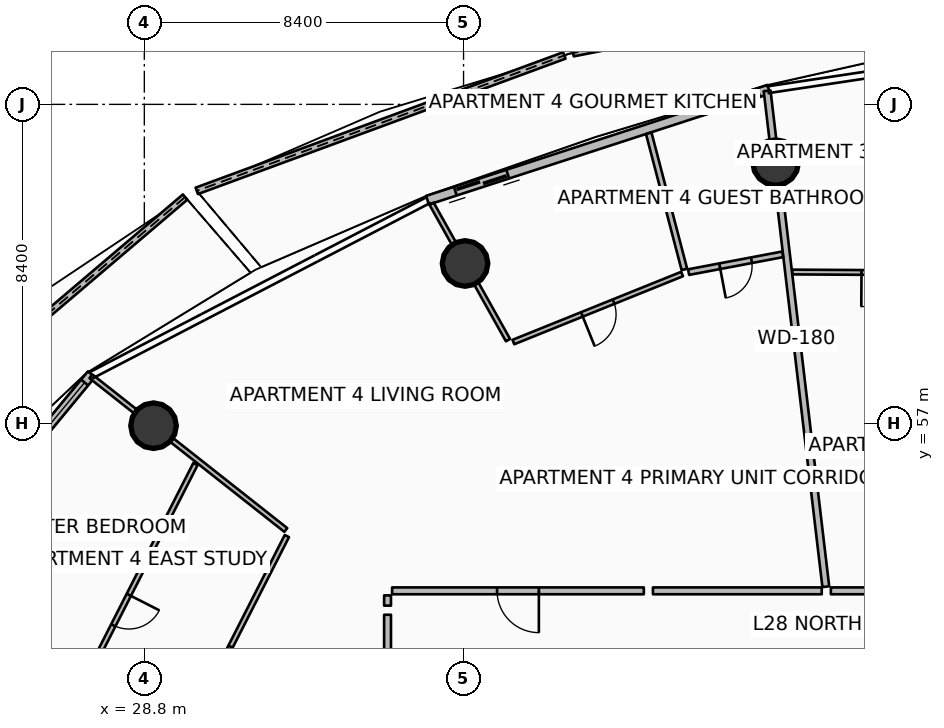
"""IFC4 building model, lengths in metres.
Left out: names, types, materials, properties, quantities, classifications, styles, units other than length and angle.
Written with IfcOpenShell. Run it as: python <this file> out.ifc"""

import sys

from ifc_helpers import new_model, si_unit, direction, frame, frame_2d, origin, origin_2d, place, context, subcontext, project, spatial, polyline, rectangle, circle, outline, extrude, element, fill, save


model = new_model("IFC4")
c1 = context("Model", 3, precision=1e-05, world=origin(), true_north=direction((0.0, 1.0)))
c2 = subcontext(c1, "Body", "Model", "MODEL_VIEW")
j1 = project(units=[si_unit("LENGTHUNIT", "METRE"), si_unit("PLANEANGLEUNIT", "RADIAN")], contexts=[c1])
p1 = place(None, origin())
s1 = spatial("IfcSite", under=j1, at=p1, CompositionType="ELEMENT")
p2 = place(p1, origin())
s2 = spatial("IfcBuilding", under=s1, at=p2, CompositionType="ELEMENT")
p3 = place(p2, frame((0.0, 0.0, 112.65)))
s3 = spatial("IfcBuildingStorey", under=s2, at=p3, CompositionType="ELEMENT", Elevation=112.65)
for number, where, z_axis, x_axis in (
    (1, (45.412, 63.869, 0.0), (0.032, -0.27, 0.962), (0.993, 0.118, 0.0)),
    (2, (37.24, 61.214, 0.0), (0.133, -0.237, 0.962), (0.872, 0.489, 0.0)),
):
    element("IfcColumn", number, at=place(p3, frame(where, z_axis=z_axis, x_axis=x_axis)), inside=s3, PredefinedType="COLUMN", context=c2, shape_type="SweptSolid", body=[
        extrude(circle(Radius=0.6, at=origin_2d()), origin(), (0.0, 0.0, 1.0), 3.606),
    ])
p4 = place(p3, frame((29.042, 56.945, 0.0), z_axis=(0.23244676176, -0.183255946608, 0.95518886142), x_axis=(0.619114149501, 0.785301005913, 0.0)))
e3 = element("IfcColumn", 3, at=p4, inside=s3, PredefinedType="COLUMN", context=c2, shape_type="SweptSolid", body=[
    extrude(circle(Radius=0.6, at=origin_2d()), origin(), (0.0, 0.0, 1.0), 3.633),
])
p5 = place(p3, frame((49.936, 68.686, 0.0), z_axis=(0.0, 0.0, 1.0), x_axis=(-0.98127943736, -0.192589370979, 0.0)))
e4 = element("IfcWall", 4, at=p5, inside=s3, PredefinedType="PARAPET", context=c2, shape_type="SweptSolid", body=[
    extrude(outline(polyline([(0.0, 0.0), (10.041, 0.0), (10.041, 1.632), (5.021, 1.418), (0.0, 1.233), (0.0, 0.0)])), frame((0.0, 0.09, 0.0), z_axis=(0.0, -1.0, 0.0), x_axis=(1.0, 0.0, 0.0)), (0.0, 0.0, 1.0), 0.18),
])
p6 = place(p3, frame((39.853, 66.687, 0.0), z_axis=(0.0, 0.0, 1.0), x_axis=(-0.938356460989, -0.345669136777, 0.0)))
e5 = element("IfcWall", 5, at=p6, inside=s3, PredefinedType="PARAPET", context=c2, shape_type="SweptSolid", body=[
    extrude(outline(polyline([(0.0, 0.0), (10.308, 0.0), (10.308, 1.86), (5.154, 1.798), (0.0, 1.632), (0.0, 0.0)])), frame((0.0, 0.09, 0.0), z_axis=(0.0, -1.0, 0.0), x_axis=(1.0, 0.0, 0.0)), (0.0, 0.0, 1.0), 0.18),
])
p7 = place(p3, frame((29.874, 62.962, 0.0), z_axis=(0.0, 0.0, 1.0), x_axis=(-0.761849488871, -0.647754086291, 0.0)))
e6 = element("IfcWall", 6, at=p7, inside=s3, PredefinedType="PARAPET", context=c2, shape_type="SweptSolid", body=[
    extrude(outline(polyline([(0.0, 0.0), (11.2, 0.0), (11.2, 1.632), (5.6, 1.798), (0.0, 1.86), (0.0, 0.0)])), frame((0.0, 0.09, 0.0), z_axis=(0.0, -1.0, 0.0), x_axis=(1.0, 0.0, 0.0)), (0.0, 0.0, 1.0), 0.18),
])
p8 = place(p3, frame((45.233, 65.797, 0.0), z_axis=(0.0, 0.0, 1.0), x_axis=(-0.951052494852, -0.30902937083, 0.0)))
e7 = element("IfcWall", 7, at=p8, inside=s3, PredefinedType="SOLIDWALL", context=c2, shape_type="SweptSolid", body=[
    extrude(rectangle(XDim=9.444, YDim=0.24, at=frame_2d((4.722, 0.0))), origin(), (0.0, 0.0, 1.0), 2.42),
])
p9 = place(p8, frame((7.224, 0.0, 0.0)))
e8 = element("IfcOpeningElement", 8, at=p9, cuts=e7, PredefinedType="OPENING", context=c2, shape_type="SweptSolid", body=[
    extrude(rectangle(XDim=1.45, YDim=2.15, at=frame_2d((0.725, 1.075))), frame((0.0, 0.13, 0.0), z_axis=(0.0, -1.0, 0.0), x_axis=(1.0, 0.0, 0.0)), (0.0, 0.0, 1.0), 0.26),
])
p10 = place(p8, frame((0.28, 0.0, 0.65)))
e9 = element("IfcOpeningElement", 9, at=p10, cuts=e7, PredefinedType="OPENING", context=c2, shape_type="SweptSolid", body=[
    extrude(rectangle(XDim=1.6, YDim=1.5, at=frame_2d((0.8, 0.75))), frame((0.0, 0.13, 0.0), z_axis=(0.0, -1.0, 0.0), x_axis=(1.0, 0.0, 0.0)), (0.0, 0.0, 1.0), 0.26),
])
p11 = place(p3, frame((27.407, 58.298, 0.0), z_axis=(0.0, 0.0, 1.0), x_axis=(-0.636704975, -0.771107498868, 0.0)))
e10 = element("IfcWall", 10, at=p11, inside=s3, PredefinedType="SOLIDWALL", context=c2, shape_type="SweptSolid", body=[
    extrude(rectangle(XDim=11.084, YDim=0.24, at=frame_2d((5.542, 0.0))), origin(), (0.0, 0.0, 1.0), 2.42),
])
p12 = place(p11, frame((8.864, 0.0, 0.0)))
e11 = element("IfcOpeningElement", 11, at=p12, cuts=e10, PredefinedType="OPENING", context=c2, shape_type="SweptSolid", body=[
    extrude(rectangle(XDim=1.45, YDim=2.15, at=frame_2d((0.725, 1.075))), frame((0.0, 0.13, 0.0), z_axis=(0.0, -1.0, 0.0), x_axis=(1.0, 0.0, 0.0)), (0.0, 0.0, 1.0), 0.26),
])
p13 = place(p11, frame((0.28, 0.0, 0.65)))
e12 = element("IfcOpeningElement", 12, at=p13, cuts=e10, PredefinedType="OPENING", context=c2, shape_type="SweptSolid", body=[
    extrude(rectangle(XDim=1.6, YDim=1.5, at=frame_2d((0.8, 0.75))), frame((0.0, 0.13, 0.0), z_axis=(0.0, -1.0, 0.0), x_axis=(1.0, 0.0, 0.0)), (0.0, 0.0, 1.0), 0.26),
])
p14 = place(p3, frame((46.732, 52.709, 0.0), z_axis=(0.0, 0.0, 1.0), x_axis=(-0.117532311618, 0.993069058891, 0.0)))
e13 = element("IfcWall", 13, at=p14, inside=s3, PredefinedType="PARTITIONING", context=c2, shape_type="SweptSolid", body=[
    extrude(rectangle(XDim=13.138, YDim=0.18, at=frame_2d((6.569, 0.0))), origin(), (0.0, 0.0, 1.0), 2.427),
])
p15 = place(p3, frame((50.869, 52.6, 0.0), z_axis=(0.0, 0.0, 1.0), x_axis=(-1.0, 0.0, 0.0)))
e14 = element("IfcWall", 14, at=p15, inside=s3, PredefinedType="PARTITIONING", context=c2, shape_type="SweptSolid", body=[
    extrude(rectangle(XDim=4.004, YDim=0.18, at=frame_2d((2.002, 0.0))), origin(), (0.0, 0.0, 1.0), 2.427),
])
p16 = place(p3, frame((50.391, 60.962, 0.0), z_axis=(0.0, 0.0, 1.0), x_axis=(-0.999982495953, 0.005916737914, 0.0)))
e15 = element("IfcWall", 15, at=p16, inside=s3, PredefinedType="PARTITIONING", context=c2, shape_type="SweptSolid", body=[
    extrude(rectangle(XDim=4.539, YDim=0.125, at=frame_2d((2.27, 0.0))), origin(), (0.0, 0.0, 1.0), 2.427),
])
p17 = place(p16, frame((1.819, 0.0, 0.0)))
e16 = element("IfcOpeningElement", 16, at=p17, cuts=e15, PredefinedType="OPENING", context=c2, shape_type="SweptSolid", body=[
    extrude(rectangle(XDim=0.9, YDim=2.08, at=frame_2d((0.45, 1.04))), frame((0.0, 0.073, 0.0), z_axis=(0.0, -1.0, 0.0), x_axis=(1.0, 0.0, 0.0)), (0.0, 0.0, 1.0), 0.145),
])
p18 = place(p3, frame((41.944, 52.6, 0.0), z_axis=(0.0, 0.0, 1.0), x_axis=(-1.0, 0.0, 0.0)))
e17 = element("IfcWall", 17, at=p18, inside=s3, PredefinedType="PARTITIONING", context=c2, shape_type="SweptSolid", body=[
    extrude(rectangle(XDim=6.624, YDim=0.18, at=frame_2d((3.312, 0.0))), origin(), (0.0, 0.0, 1.0), 2.427),
])
p19 = place(p18, frame((2.762, 0.0, 0.0)))
e18 = element("IfcOpeningElement", 18, at=p19, cuts=e17, PredefinedType="OPENING", context=c2, shape_type="SweptSolid", body=[
    extrude(rectangle(XDim=1.1, YDim=2.1, at=frame_2d((0.55, 1.05))), frame((0.0, 0.1, 0.0), z_axis=(0.0, -1.0, 0.0), x_axis=(1.0, 0.0, 0.0)), (0.0, 0.0, 1.0), 0.2),
])
p20 = place(p3, frame((35.2, 52.48, 0.0), z_axis=(0.0, 0.0, 1.0), x_axis=(0.0, -1.0, 0.0)))
e19 = element("IfcWall", 19, at=p20, inside=s3, PredefinedType="PARTITIONING", context=c2, shape_type="SweptSolid", body=[
    extrude(rectangle(XDim=0.269, YDim=0.18, at=frame_2d((0.135, 0.0))), origin(), (0.0, 0.0, 1.0), 2.427),
])
p21 = place(p3, frame((46.625, 52.6, 0.0), z_axis=(0.0, 0.0, 1.0), x_axis=(-1.0, 0.0, 0.0)))
e20 = element("IfcWall", 20, at=p21, inside=s3, PredefinedType="PARTITIONING", context=c2, shape_type="SweptSolid", body=[
    extrude(rectangle(XDim=4.442, YDim=0.18, at=frame_2d((2.221, 0.0))), origin(), (0.0, 0.0, 1.0), 2.427),
])
p22 = place(p3, frame((38.37, 59.196, 0.0), z_axis=(0.0, 0.0, 1.0), x_axis=(-0.488603368932, 0.87250601595, 0.0)))
e21 = element("IfcWall", 21, at=p22, inside=s3, PredefinedType="PARTITIONING", context=c2, shape_type="SweptSolid", body=[
    extrude(rectangle(XDim=4.113, YDim=0.125, at=frame_2d((2.057, 0.0))), origin(), (0.0, 0.0, 1.0), 2.427),
])
p23 = place(p3, frame((45.597, 61.455, 0.0), z_axis=(0.0, 0.0, 1.0), x_axis=(-0.982581250532, -0.18583349026, 0.0)))
e22 = element("IfcWall", 22, at=p23, inside=s3, PredefinedType="PARTITIONING", context=c2, shape_type="SweptSolid", body=[
    extrude(rectangle(XDim=2.519, YDim=0.15, at=frame_2d((1.259, 0.0))), origin(), (0.0, 0.0, 1.0), 2.427),
])
p24 = place(p23, frame((0.834, 0.0, 0.0)))
e23 = element("IfcOpeningElement", 23, at=p24, cuts=e22, PredefinedType="OPENING", context=c2, shape_type="SweptSolid", body=[
    extrude(rectangle(XDim=0.85, YDim=2.06, at=frame_2d((0.425, 1.03))), frame((0.0, 0.085, 0.0), z_axis=(0.0, -1.0, 0.0), x_axis=(1.0, 0.0, 0.0)), (0.0, 0.0, 1.0), 0.17),
])
p25 = place(p3, frame((43.011, 61.057, 0.0), z_axis=(0.0, 0.0, 1.0), x_axis=(-0.2532403996, 0.967403380194, 0.0)))
e24 = element("IfcWall", 24, at=p25, inside=s3, PredefinedType="PARTITIONING", context=c2, shape_type="SweptSolid", body=[
    extrude(rectangle(XDim=3.703, YDim=0.15, at=frame_2d((1.852, 0.0))), origin(), (0.0, 0.0, 1.0), 2.445),
])
p26 = place(p3, frame((42.95, 60.936, 0.0), z_axis=(0.0, 0.0, 1.0), x_axis=(-0.927456594122, -0.373930830529, 0.0)))
e25 = element("IfcWall", 25, at=p26, inside=s3, PredefinedType="PARTITIONING", context=c2, shape_type="SweptSolid", body=[
    extrude(rectangle(XDim=4.786, YDim=0.125, at=frame_2d((2.393, 0.0))), origin(), (0.0, 0.0, 1.0), 2.427),
])
p27 = place(p26, frame((1.943, 0.0, 0.0)))
e26 = element("IfcOpeningElement", 26, at=p27, cuts=e25, PredefinedType="OPENING", context=c2, shape_type="SweptSolid", body=[
    extrude(rectangle(XDim=0.9, YDim=2.08, at=frame_2d((0.45, 1.04))), frame((0.0, 0.073, 0.0), z_axis=(0.0, -1.0, 0.0), x_axis=(1.0, 0.0, 0.0)), (0.0, 0.0, 1.0), 0.145),
])
p28 = place(p3, frame((35.2, 51.971, 0.0), z_axis=(0.0, 0.0, 1.0), x_axis=(0.0, -1.0, 0.0)))
e27 = element("IfcWall", 27, at=p28, inside=s3, PredefinedType="PARTITIONING", context=c2, shape_type="SweptSolid", body=[
    extrude(rectangle(XDim=6.241, YDim=0.18, at=frame_2d((3.12, 0.0))), origin(), (0.0, 0.0, 1.0), 2.427),
])
p29 = place(p3, frame((32.522, 54.202, 0.0), z_axis=(0.0, 0.0, 1.0), x_axis=(-0.785296086335, 0.619120389574, 0.0)))
e28 = element("IfcWall", 28, at=p29, inside=s3, PredefinedType="PARTITIONING", context=c2, shape_type="SweptSolid", body=[
    extrude(rectangle(XDim=6.529, YDim=0.125, at=frame_2d((3.265, 0.0))), origin(), (0.0, 0.0, 1.0), 2.427),
])
p30 = place(p3, frame((32.551, 54.042, 0.0), z_axis=(0.0, 0.0, 1.0), x_axis=(-0.45400796994, -0.890997622461, 0.0)))
e29 = element("IfcWall", 29, at=p30, inside=s3, PredefinedType="PARTITIONING", context=c2, shape_type="SweptSolid", body=[
    extrude(rectangle(XDim=7.431, YDim=0.125, at=frame_2d((3.716, 0.0))), origin(), (0.0, 0.0, 1.0), 2.427),
])
p31 = place(p30, frame((3.265, 0.0, 0.0)))
e30 = element("IfcOpeningElement", 30, at=p31, cuts=e29, PredefinedType="OPENING", context=c2, shape_type="SweptSolid", body=[
    extrude(rectangle(XDim=0.9, YDim=2.08, at=frame_2d((0.45, 1.04))), frame((0.0, 0.073, 0.0), z_axis=(0.0, -1.0, 0.0), x_axis=(1.0, 0.0, 0.0)), (0.0, 0.0, 1.0), 0.145),
])
p32 = place(p3, frame((30.146, 55.938, 0.0), z_axis=(0.0, 0.0, 1.0), x_axis=(-0.454004640198, -0.890999319124, 0.0)))
e31 = element("IfcWall", 31, at=p32, inside=s3, PredefinedType="PARTITIONING", context=c2, shape_type="SweptSolid", body=[
    extrude(rectangle(XDim=8.626, YDim=0.125, at=frame_2d((4.313, 0.0))), origin(), (0.0, 0.0, 1.0), 2.427),
])
p33 = place(p32, frame((3.863, 0.0, 0.0)))
e32 = element("IfcOpeningElement", 32, at=p33, cuts=e31, PredefinedType="OPENING", context=c2, shape_type="SweptSolid", body=[
    extrude(rectangle(XDim=0.9, YDim=2.08, at=frame_2d((0.45, 1.04))), frame((0.0, 0.073, 0.0), z_axis=(0.0, -1.0, 0.0), x_axis=(1.0, 0.0, 0.0)), (0.0, 0.0, 1.0), 0.145),
])
p34 = place(p9, origin())
e33 = element("IfcDoor", 33, at=p34, inside=s3, OperationType="DOUBLE_DOOR_SLIDING", PredefinedType="DOOR", context=c2, shape_type="SweptSolid", body=[
    extrude(rectangle(XDim=1.45, YDim=2.15, at=frame_2d((0.725, 1.075))), frame((0.0, 0.025, 0.0), z_axis=(0.0, -1.0, 0.0), x_axis=(1.0, 0.0, 0.0)), (0.0, 0.0, 1.0), 0.05),
])
fill(e8, e33)
p35 = place(p10, origin())
e34 = element("IfcWindow", 34, at=p35, inside=s3, PartitioningType="SINGLE_PANEL", PredefinedType="WINDOW", context=c2, shape_type="SweptSolid", body=[
    extrude(rectangle(XDim=1.6, YDim=1.5, at=frame_2d((0.8, 0.75))), frame((0.0, 0.03, 0.0), z_axis=(0.0, -1.0, 0.0), x_axis=(1.0, 0.0, 0.0)), (0.0, 0.0, 1.0), 0.06),
])
fill(e9, e34)
p36 = place(p13, origin())
e35 = element("IfcWindow", 35, at=p36, inside=s3, PartitioningType="SINGLE_PANEL", PredefinedType="WINDOW", context=c2, shape_type="SweptSolid", body=[
    extrude(rectangle(XDim=1.6, YDim=1.5, at=frame_2d((0.8, 0.75))), frame((0.0, 0.03, 0.0), z_axis=(0.0, -1.0, 0.0), x_axis=(1.0, 0.0, 0.0)), (0.0, 0.0, 1.0), 0.06),
])
fill(e12, e35)
p37 = place(p17, origin())
e36 = element("IfcDoor", 36, at=p37, inside=s3, OperationType="SINGLE_SWING_RIGHT", PredefinedType="DOOR", context=c2, shape_type="SweptSolid", body=[
    extrude(rectangle(XDim=0.9, YDim=2.08, at=frame_2d((0.45, 1.04))), frame((0.0, 0.025, 0.0), z_axis=(0.0, -1.0, 0.0), x_axis=(1.0, 0.0, 0.0)), (0.0, 0.0, 1.0), 0.05),
])
fill(e16, e36)
p38 = place(p19, origin())
e37 = element("IfcDoor", 37, at=p38, inside=s3, OperationType="SINGLE_SWING_LEFT", PredefinedType="DOOR", context=c2, shape_type="SweptSolid", body=[
    extrude(rectangle(XDim=1.1, YDim=2.1, at=frame_2d((0.55, 1.05))), frame((0.0, 0.025, 0.0), z_axis=(0.0, -1.0, 0.0), x_axis=(1.0, 0.0, 0.0)), (0.0, 0.0, 1.0), 0.05),
])
fill(e18, e37)
p39 = place(p24, origin())
e38 = element("IfcDoor", 38, at=p39, inside=s3, OperationType="SINGLE_SWING_RIGHT", PredefinedType="DOOR", context=c2, shape_type="SweptSolid", body=[
    extrude(rectangle(XDim=0.85, YDim=2.06, at=frame_2d((0.425, 1.03))), frame((0.0, 0.025, 0.0), z_axis=(0.0, -1.0, 0.0), x_axis=(1.0, 0.0, 0.0)), (0.0, 0.0, 1.0), 0.05),
])
fill(e23, e38)
p40 = place(p27, origin())
e39 = element("IfcDoor", 39, at=p40, inside=s3, OperationType="SINGLE_SWING_RIGHT", PredefinedType="DOOR", context=c2, shape_type="SweptSolid", body=[
    extrude(rectangle(XDim=0.9, YDim=2.08, at=frame_2d((0.45, 1.04))), frame((0.0, 0.025, 0.0), z_axis=(0.0, -1.0, 0.0), x_axis=(1.0, 0.0, 0.0)), (0.0, 0.0, 1.0), 0.05),
])
fill(e26, e39)
p41 = place(p31, origin())
e40 = element("IfcDoor", 40, at=p41, inside=s3, OperationType="SINGLE_SWING_RIGHT", PredefinedType="DOOR", context=c2, shape_type="SweptSolid", body=[
    extrude(rectangle(XDim=0.9, YDim=2.08, at=frame_2d((0.45, 1.04))), frame((0.0, 0.025, 0.0), z_axis=(0.0, -1.0, 0.0), x_axis=(1.0, 0.0, 0.0)), (0.0, 0.0, 1.0), 0.05),
])
fill(e30, e40)
p42 = place(p33, origin())
e41 = element("IfcDoor", 41, at=p42, inside=s3, OperationType="SINGLE_SWING_LEFT", PredefinedType="DOOR", context=c2, shape_type="SweptSolid", body=[
    extrude(rectangle(XDim=0.9, YDim=2.08, at=frame_2d((0.45, 1.04))), frame((0.0, 0.025, 0.0), z_axis=(0.0, -1.0, 0.0), x_axis=(1.0, 0.0, 0.0)), (0.0, 0.0, 1.0), 0.05),
])
fill(e32, e41)
save(model, sys.argv[1])
